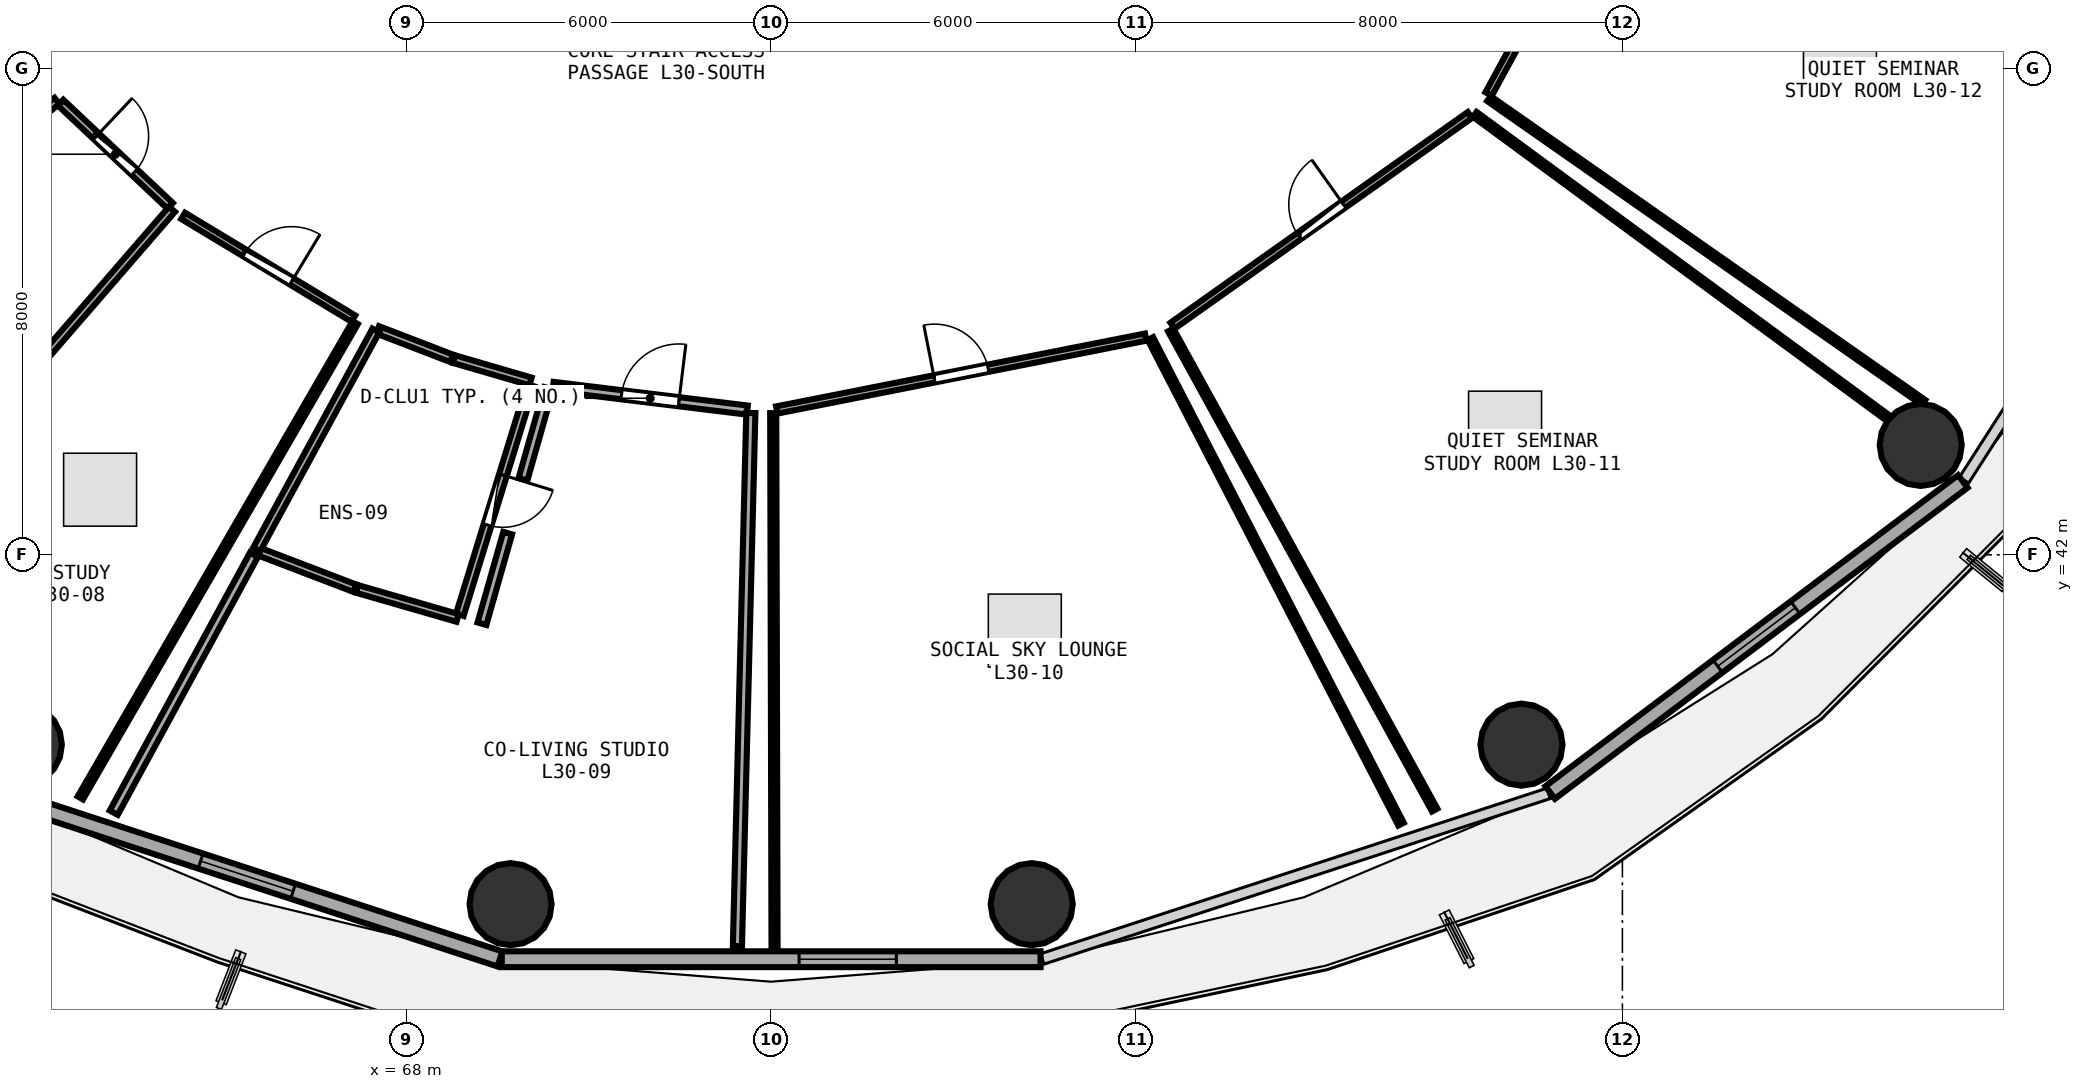
"""IFC4 building model, lengths in metres.
Left out: names, types, materials, properties, quantities, classifications, styles, units other than length and angle.
Written with IfcOpenShell. Run it as: python <this file> out.ifc"""

import sys

from ifc_helpers import new_model, si_unit, direction, frame, frame_2d, origin, origin_2d, place, context, subcontext, project, spatial, rectangle, circle, extrude, element, fill, save


model = new_model("IFC4")
c1 = context("Model", 3, precision=1e-05, world=origin(), true_north=direction((0.0, 1.0)))
c2 = subcontext(c1, "Body", "Model", "MODEL_VIEW")
j1 = project(units=[si_unit("LENGTHUNIT", "METRE"), si_unit("PLANEANGLEUNIT", "RADIAN")], contexts=[c1])
p1 = place(None, origin())
s1 = spatial("IfcSite", under=j1, at=p1, CompositionType="ELEMENT")
p2 = place(p1, origin())
s2 = spatial("IfcBuilding", under=s1, at=p2, CompositionType="ELEMENT")
p3 = place(p2, frame((0.0, 0.0, 117.6)))
s3 = spatial("IfcBuildingStorey", under=s2, at=p3, CompositionType="ELEMENT", Elevation=117.6)
for number, where, z_axis, x_axis in (
    (1, (61.66, 38.878, 0.0), (0.0, 0.0, 1.0), (1.0, 0.0, 0.0)),
    (2, (69.714, 36.255, 0.0), (0.0, 0.0, 1.0), (1.0, 0.0, 0.0)),
    (3, (78.286, 36.255, 0.0), (0.0, 0.0, 1.0), (1.0, 0.0, 0.0)),
    (4, (86.34, 38.878, 0.0), (0.0, 0.0, 1.0), (1.0, 0.0, 0.0)),
    (5, (92.906, 43.807, 0.0), (0.0, 0.0, 1.0), (1.0, 0.0, 0.0)),
):
    element("IfcColumn", number, at=place(p3, frame(where, z_axis=z_axis, x_axis=x_axis)), inside=s3, PredefinedType="COLUMN", context=c2, shape_type="SweptSolid", body=[
        extrude(circle(Radius=0.675, at=origin_2d()), origin(), (0.0, 0.0, 1.0), 3.75),
    ])
p4 = place(p3, frame((61.214, 38.077, 0.0), z_axis=(0.0, 0.0, 1.0), x_axis=(0.950471101963, -0.310812941064, 0.0)))
e6 = element("IfcWall", 6, at=p4, inside=s3, PredefinedType="SOLIDWALL", context=c2, shape_type="SweptSolid", body=[
    extrude(rectangle(XDim=8.76, YDim=0.26, at=frame_2d((4.38, 0.0))), origin(), (0.0, 0.0, 1.0), 3.475),
])
p5 = place(p4, frame((3.58, 0.0, 0.85)))
e7 = element("IfcOpeningElement", 7, at=p5, cuts=e6, PredefinedType="OPENING", context=c2, shape_type="SweptSolid", body=[
    extrude(rectangle(XDim=1.6, YDim=1.45, at=frame_2d((0.8, 0.725))), frame((0.0, 0.14, 0.0), z_axis=(0.0, -1.0, 0.0), x_axis=(1.0, 0.0, 0.0)), (0.0, 0.0, 1.0), 0.28),
])
p6 = place(p3, frame((69.57, 35.349, 0.0), z_axis=(0.0, 0.0, 1.0), x_axis=(1.0, 0.0, 0.0)))
e8 = element("IfcWall", 8, at=p6, inside=s3, PredefinedType="SOLIDWALL", context=c2, shape_type="SweptSolid", body=[
    extrude(rectangle(XDim=8.861, YDim=0.26, at=frame_2d((4.43, 0.0))), origin(), (0.0, 0.0, 1.0), 3.475),
])
p7 = place(p6, frame((4.89, 0.0, 0.85)))
e9 = element("IfcOpeningElement", 9, at=p7, cuts=e8, PredefinedType="OPENING", context=c2, shape_type="SweptSolid", body=[
    extrude(rectangle(XDim=1.6, YDim=1.45, at=frame_2d((0.8, 0.725))), frame((0.0, 0.14, 0.0), z_axis=(0.0, -1.0, 0.0), x_axis=(1.0, 0.0, 0.0)), (0.0, 0.0, 1.0), 0.28),
])
p8 = place(p3, frame((86.812, 38.09, 0.0), z_axis=(0.0, 0.0, 1.0), x_axis=(0.798501507879, 0.601992808857, 0.0)))
e10 = element("IfcWall", 10, at=p8, inside=s3, PredefinedType="SOLIDWALL", context=c2, shape_type="SweptSolid", body=[
    extrude(rectangle(XDim=8.499, YDim=0.26, at=frame_2d((4.25, 0.0))), origin(), (0.0, 0.0, 1.0), 3.475),
])
p9 = place(p8, frame((3.45, 0.0, 0.85)))
e11 = element("IfcOpeningElement", 11, at=p9, cuts=e10, PredefinedType="OPENING", context=c2, shape_type="SweptSolid", body=[
    extrude(rectangle(XDim=1.6, YDim=1.45, at=frame_2d((0.8, 0.725))), frame((0.0, 0.14, 0.0), z_axis=(0.0, -1.0, 0.0), x_axis=(1.0, 0.0, 0.0)), (0.0, 0.0, 1.0), 0.28),
])
p10 = place(p3, frame((62.314, 49.437, 0.0), z_axis=(0.0, 0.0, 1.0), x_axis=(0.727704720547, -0.68589054498, 0.0)))
e12 = element("IfcWall", 12, at=p10, inside=s3, PredefinedType="PLUMBINGWALL", context=c2, shape_type="SweptSolid", body=[
    extrude(rectangle(XDim=2.476, YDim=0.13, at=frame_2d((1.238, 0.0))), origin(), (0.0, 0.0, 1.0), 2.925),
])
p11 = place(p10, frame((0.808, 0.0, 0.0)))
e13 = element("IfcOpeningElement", 13, at=p11, cuts=e12, PredefinedType="OPENING", context=c2, shape_type="SweptSolid", body=[
    extrude(rectangle(XDim=0.86, YDim=2.05, at=frame_2d((0.43, 1.025))), frame((0.0, 0.075, 0.0), z_axis=(0.0, -1.0, 0.0), x_axis=(1.0, 0.0, 0.0)), (0.0, 0.0, 1.0), 0.15),
])
p12 = place(p3, frame((64.329, 47.574, 0.0), z_axis=(0.0, 0.0, 1.0), x_axis=(0.8562252486, -0.516602674848, 0.0)))
e14 = element("IfcWall", 14, at=p12, inside=s3, PredefinedType="PARTITIONING", context=c2, shape_type="SweptSolid", body=[
    extrude(rectangle(XDim=3.269, YDim=0.12, at=frame_2d((1.635, 0.0))), origin(), (0.0, 0.0, 1.0), 2.925),
])
p13 = place(p12, frame((1.185, 0.0, 0.0)))
e15 = element("IfcOpeningElement", 15, at=p13, cuts=e14, PredefinedType="OPENING", context=c2, shape_type="SweptSolid", body=[
    extrude(rectangle(XDim=0.9, YDim=2.08, at=frame_2d((0.45, 1.04))), frame((0.0, 0.07, 0.0), z_axis=(0.0, -1.0, 0.0), x_axis=(1.0, 0.0, 0.0)), (0.0, 0.0, 1.0), 0.14),
])
p14 = place(p3, frame((70.044, 44.789, 0.0), z_axis=(0.0, 0.0, 1.0), x_axis=(-0.294737077858, -0.955578387646, 0.0)))
e16 = element("IfcWall", 16, at=p14, inside=s3, PredefinedType="PLUMBINGWALL", context=c2, shape_type="SweptSolid", body=[
    extrude(rectangle(XDim=3.951, YDim=0.13, at=frame_2d((1.976, 0.0))), origin(), (0.0, 0.0, 1.0), 3.175),
])
p15 = place(p14, frame((1.545, 0.0, 0.0)))
e17 = element("IfcOpeningElement", 17, at=p15, cuts=e16, PredefinedType="OPENING", context=c2, shape_type="SweptSolid", body=[
    extrude(rectangle(XDim=0.86, YDim=2.05, at=frame_2d((0.43, 1.025))), frame((0.0, 0.075, 0.0), z_axis=(0.0, -1.0, 0.0), x_axis=(1.0, 0.0, 0.0)), (0.0, 0.0, 1.0), 0.15),
])
p16 = place(p3, frame((70.414, 44.77, 0.0), z_axis=(0.0, 0.0, 1.0), x_axis=(0.992649213004, -0.12102702146, 0.0)))
e18 = element("IfcWall", 18, at=p16, inside=s3, PredefinedType="PARTITIONING", context=c2, shape_type="SweptSolid", body=[
    extrude(rectangle(XDim=3.218, YDim=0.15, at=frame_2d((1.609, 0.0))), origin(), (0.0, 0.0, 1.0), 3.48),
])
p17 = place(p16, frame((1.134, 0.0, 0.0)))
e19 = element("IfcOpeningElement", 19, at=p17, cuts=e18, PredefinedType="OPENING", context=c2, shape_type="SweptSolid", body=[
    extrude(rectangle(XDim=0.95, YDim=2.08, at=frame_2d((0.475, 1.04))), frame((0.0, 0.085, 0.0), z_axis=(0.0, -1.0, 0.0), x_axis=(1.0, 0.0, 0.0)), (0.0, 0.0, 1.0), 0.17),
])
p18 = place(p3, frame((74.093, 44.382, 0.0), z_axis=(0.0, 0.0, 1.0), x_axis=(0.981035031673, 0.193830510061, 0.0)))
e20 = element("IfcWall", 20, at=p18, inside=s3, PredefinedType="PARTITIONING", context=c2, shape_type="SweptSolid", body=[
    extrude(rectangle(XDim=6.184, YDim=0.12, at=frame_2d((3.092, 0.0))), origin(), (0.0, 0.0, 1.0), 3.235),
])
p19 = place(p18, frame((2.642, 0.0, 0.0)))
e21 = element("IfcOpeningElement", 21, at=p19, cuts=e20, PredefinedType="OPENING", context=c2, shape_type="SweptSolid", body=[
    extrude(rectangle(XDim=0.9, YDim=2.08, at=frame_2d((0.45, 1.04))), frame((0.0, 0.07, 0.0), z_axis=(0.0, -1.0, 0.0), x_axis=(1.0, 0.0, 0.0)), (0.0, 0.0, 1.0), 0.14),
])
p20 = place(p3, frame((80.601, 45.768, 0.0), z_axis=(0.0, 0.0, 1.0), x_axis=(0.815932399176, 0.578147316846, 0.0)))
e22 = element("IfcWall", 22, at=p20, inside=s3, PredefinedType="PARTITIONING", context=c2, shape_type="SweptSolid", body=[
    extrude(rectangle(XDim=5.993, YDim=0.12, at=frame_2d((2.997, 0.0))), origin(), (0.0, 0.0, 1.0), 2.925),
])
p21 = place(p20, frame((2.546, 0.0, 0.0)))
e23 = element("IfcOpeningElement", 23, at=p21, cuts=e22, PredefinedType="OPENING", context=c2, shape_type="SweptSolid", body=[
    extrude(rectangle(XDim=0.9, YDim=2.08, at=frame_2d((0.45, 1.04))), frame((0.0, 0.07, 0.0), z_axis=(0.0, -1.0, 0.0), x_axis=(1.0, 0.0, 0.0)), (0.0, 0.0, 1.0), 0.14),
])
p22 = place(p3, frame((85.801, 49.579, 0.0), z_axis=(0.0, 0.0, 1.0), x_axis=(0.478256103777, 0.878220416069, 0.0)))
e24 = element("IfcWall", 24, at=p22, inside=s3, PredefinedType="PARTITIONING", context=c2, shape_type="SweptSolid", body=[
    extrude(rectangle(XDim=5.741, YDim=0.12, at=frame_2d((2.871, 0.0))), origin(), (0.0, 0.0, 1.0), 2.925),
])
p23 = place(p22, frame((2.42, 0.0, 0.0)))
e25 = element("IfcOpeningElement", 25, at=p23, cuts=e24, PredefinedType="OPENING", context=c2, shape_type="SweptSolid", body=[
    extrude(rectangle(XDim=0.9, YDim=2.08, at=frame_2d((0.45, 1.04))), frame((0.0, 0.07, 0.0), z_axis=(0.0, -1.0, 0.0), x_axis=(1.0, 0.0, 0.0)), (0.0, 0.0, 1.0), 0.14),
])
p24 = place(p3, frame((64.146, 47.683, 0.0), z_axis=(0.0, 0.0, 1.0), x_axis=(-0.654725816563, -0.75586645985, 0.0)))
e26 = element("IfcWall", 26, at=p24, inside=s3, PredefinedType="PLUMBINGWALL", context=c2, shape_type="SweptSolid", body=[
    extrude(rectangle(XDim=3.36, YDim=0.13, at=frame_2d((1.68, 0.0))), origin(), (0.0, 0.0, 1.0), 3.235),
])
p25 = place(p3, frame((59.633, 47.365, 0.0), z_axis=(0.0, 0.0, 1.0), x_axis=(0.780343931947, 0.625350579974, 0.0)))
e27 = element("IfcWall", 27, at=p25, inside=s3, PredefinedType="PLUMBINGWALL", context=c2, shape_type="SweptSolid", body=[
    extrude(rectangle(XDim=3.36, YDim=0.13, at=frame_2d((1.68, 0.0))), origin(), (0.0, 0.0, 1.0), 3.235),
])
p26 = place(p3, frame((67.16, 45.819, 0.0), z_axis=(0.0, 0.0, 1.0), x_axis=(-0.500668535271, -0.865639080558, 0.0)))
e28 = element("IfcWall", 28, at=p26, inside=s3, PredefinedType="PARTITIONING", context=c2, shape_type="SweptSolid", body=[
    extrude(rectangle(XDim=9.03, YDim=0.1, at=frame_2d((4.515, 0.0))), origin(), (0.0, 0.0, 1.0), 2.925),
])
p27 = place(p3, frame((67.528, 45.7, 0.0), z_axis=(0.0, 0.0, 1.0), x_axis=(0.933311844858, -0.359066846488, 0.0)))
e29 = element("IfcWall", 29, at=p27, inside=s3, PredefinedType="PLUMBINGWALL", context=c2, shape_type="SweptSolid", body=[
    extrude(rectangle(XDim=1.305, YDim=0.13, at=frame_2d((0.652, 0.0))), origin(), (0.0, 0.0, 1.0), 2.925),
])
p28 = place(p3, frame((68.783, 45.219, 0.0), z_axis=(0.0, 0.0, 1.0), x_axis=(0.960085412009, -0.279706992489, 0.0)))
e30 = element("IfcWall", 30, at=p28, inside=s3, PredefinedType="PLUMBINGWALL", context=c2, shape_type="SweptSolid", body=[
    extrude(rectangle(XDim=1.312, YDim=0.13, at=frame_2d((0.656, 0.0))), origin(), (0.0, 0.0, 1.0), 3.48),
])
p29 = place(p3, frame((68.843, 40.961, 0.0), z_axis=(0.0, 0.0, 1.0), x_axis=(-0.960750273448, 0.277414693321, 0.0)))
e31 = element("IfcWall", 31, at=p29, inside=s3, PredefinedType="PLUMBINGWALL", context=c2, shape_type="SweptSolid", body=[
    extrude(rectangle(XDim=1.723, YDim=0.13, at=frame_2d((0.862, 0.0))), origin(), (0.0, 0.0, 1.0), 2.925),
])
p30 = place(p3, frame((67.149, 41.452, 0.0), z_axis=(0.0, 0.0, 1.0), x_axis=(-0.934103540356, 0.357002207127, 0.0)))
e32 = element("IfcWall", 32, at=p30, inside=s3, PredefinedType="PLUMBINGWALL", context=c2, shape_type="SweptSolid", body=[
    extrude(rectangle(XDim=1.714, YDim=0.13, at=frame_2d((0.857, 0.0))), origin(), (0.0, 0.0, 1.0), 3.48),
])
p31 = place(p3, frame((65.54, 42.089, 0.0), z_axis=(0.0, 0.0, 1.0), x_axis=(0.478075883312, 0.878318535496, 0.0)))
e33 = element("IfcWall", 33, at=p31, inside=s3, PredefinedType="PLUMBINGWALL", context=c2, shape_type="SweptSolid", body=[
    extrude(rectangle(XDim=4.1, YDim=0.13, at=frame_2d((2.05, 0.0))), origin(), (0.0, 0.0, 1.0), 2.925),
])
p32 = place(p3, frame((73.666, 44.333, 0.0), z_axis=(0.0, 0.0, 1.0), x_axis=(-0.025193894125, -0.999682583473, 0.0)))
e34 = element("IfcWall", 34, at=p32, inside=s3, PredefinedType="PARTITIONING", context=c2, shape_type="SweptSolid", body=[
    extrude(rectangle(XDim=8.77, YDim=0.15, at=frame_2d((4.385, 0.0))), origin(), (0.0, 0.0, 1.0), 2.975),
])
p33 = place(p3, frame((63.188, 37.759, 0.0), z_axis=(0.0, 0.0, 1.0), x_axis=(0.477678819353, 0.878534544307, 0.0)))
e35 = element("IfcWall", 35, at=p33, inside=s3, PredefinedType="PARTITIONING", context=c2, shape_type="SweptSolid", body=[
    extrude(rectangle(XDim=4.827, YDim=0.15, at=frame_2d((2.414, 0.0))), origin(), (0.0, 0.0, 1.0), 2.975),
])
p34 = place(p3, frame((69.244, 40.866, 0.0), z_axis=(0.0, 0.0, 1.0), x_axis=(0.273076599945, 0.961992292361, 0.0)))
e36 = element("IfcWall", 36, at=p34, inside=s3, PredefinedType="PARTITIONING", context=c2, shape_type="SweptSolid", body=[
    extrude(rectangle(XDim=1.549, YDim=0.15, at=frame_2d((0.775, 0.0))), origin(), (0.0, 0.0, 1.0), 3.175),
])
p35 = place(p3, frame((69.918, 43.242, 0.0), z_axis=(0.0, 0.0, 1.0), x_axis=(0.273103794408, 0.961984572371, 0.0)))
e37 = element("IfcWall", 37, at=p35, inside=s3, PredefinedType="PARTITIONING", context=c2, shape_type="SweptSolid", body=[
    extrude(rectangle(XDim=1.555, YDim=0.15, at=frame_2d((0.778, 0.0))), origin(), (0.0, 0.0, 1.0), 3.48),
])
p36 = place(p3, frame((80.237, 45.556, 0.0), z_axis=(0.0, 0.0, 1.0), x_axis=(0.458694817529, -0.888593869196, 0.0)))
e38 = element("IfcWall", 38, at=p36, inside=s3, PredefinedType="PARTITIONING", context=c2, shape_type="SweptSolid", body=[
    extrude(rectangle(XDim=8.987, YDim=0.1, at=frame_2d((4.494, 0.0))), origin(), (0.0, 0.0, 1.0), 2.925),
])
p37 = place(p3, frame((74.056, 35.56, 0.0), z_axis=(0.0, 0.0, 1.0), x_axis=(-0.00247758273, 0.999996930787, 0.0)))
e39 = element("IfcWall", 39, at=p37, inside=s3, PredefinedType="PARTITIONING", context=c2, shape_type="SweptSolid", body=[
    extrude(rectangle(XDim=8.77, YDim=0.1, at=frame_2d((4.385, 0.0))), origin(), (0.0, 0.0, 1.0), 2.975),
])
p38 = place(p3, frame((85.572, 49.243, 0.0), z_axis=(0.0, 0.0, 1.0), x_axis=(0.805852200235, -0.592116737963, 0.0)))
e40 = element("IfcWall", 40, at=p38, inside=s3, PredefinedType="PARTITIONING", context=c2, shape_type="SweptSolid", body=[
    extrude(rectangle(XDim=8.43, YDim=0.1, at=frame_2d((4.215, 0.0))), origin(), (0.0, 0.0, 1.0), 2.925),
])
p39 = place(p3, frame((84.913, 37.803, 0.0), z_axis=(0.0, 0.0, 1.0), x_axis=(-0.481837612944, 0.876260529039, 0.0)))
e41 = element("IfcWall", 41, at=p39, inside=s3, PredefinedType="PARTITIONING", context=c2, shape_type="SweptSolid", body=[
    extrude(rectangle(XDim=9.01, YDim=0.1, at=frame_2d((4.505, 0.0))), origin(), (0.0, 0.0, 1.0), 2.925),
])
p40 = place(p3, frame((92.953, 44.506, 0.0), z_axis=(0.0, 0.0, 1.0), x_axis=(-0.8195552972, 0.573000100201, 0.0)))
e42 = element("IfcWall", 42, at=p40, inside=s3, PredefinedType="PARTITIONING", context=c2, shape_type="SweptSolid", body=[
    extrude(rectangle(XDim=8.722, YDim=0.1, at=frame_2d((4.361, 0.0))), origin(), (0.0, 0.0, 1.0), 3.175),
])
p41 = place(p5, origin())
e43 = element("IfcWindow", 43, at=p41, inside=s3, PartitioningType="SINGLE_PANEL", PredefinedType="WINDOW", context=c2, shape_type="SweptSolid", body=[
    extrude(rectangle(XDim=1.6, YDim=1.45, at=frame_2d((0.8, 0.725))), frame((0.0, 0.03, 0.0), z_axis=(0.0, -1.0, 0.0), x_axis=(1.0, 0.0, 0.0)), (0.0, 0.0, 1.0), 0.06),
])
fill(e7, e43)
p42 = place(p7, origin())
e44 = element("IfcWindow", 44, at=p42, inside=s3, PartitioningType="SINGLE_PANEL", PredefinedType="WINDOW", context=c2, shape_type="SweptSolid", body=[
    extrude(rectangle(XDim=1.6, YDim=1.45, at=frame_2d((0.8, 0.725))), frame((0.0, 0.03, 0.0), z_axis=(0.0, -1.0, 0.0), x_axis=(1.0, 0.0, 0.0)), (0.0, 0.0, 1.0), 0.06),
])
fill(e9, e44)
p43 = place(p9, origin())
e45 = element("IfcWindow", 45, at=p43, inside=s3, PartitioningType="SINGLE_PANEL", PredefinedType="WINDOW", context=c2, shape_type="SweptSolid", body=[
    extrude(rectangle(XDim=1.6, YDim=1.45, at=frame_2d((0.8, 0.725))), frame((0.0, 0.03, 0.0), z_axis=(0.0, -1.0, 0.0), x_axis=(1.0, 0.0, 0.0)), (0.0, 0.0, 1.0), 0.06),
])
fill(e11, e45)
p44 = place(p11, origin())
e46 = element("IfcDoor", 46, at=p44, inside=s3, OperationType="SINGLE_SWING_LEFT", PredefinedType="DOOR", context=c2, shape_type="SweptSolid", body=[
    extrude(rectangle(XDim=0.86, YDim=2.05, at=frame_2d((0.43, 1.025))), frame((0.0, 0.025, 0.0), z_axis=(0.0, -1.0, 0.0), x_axis=(1.0, 0.0, 0.0)), (0.0, 0.0, 1.0), 0.05),
])
fill(e13, e46)
p45 = place(p13, origin())
e47 = element("IfcDoor", 47, at=p45, inside=s3, OperationType="SINGLE_SWING_RIGHT", PredefinedType="DOOR", context=c2, shape_type="SweptSolid", body=[
    extrude(rectangle(XDim=0.9, YDim=2.08, at=frame_2d((0.45, 1.04))), frame((0.0, 0.025, 0.0), z_axis=(0.0, -1.0, 0.0), x_axis=(1.0, 0.0, 0.0)), (0.0, 0.0, 1.0), 0.05),
])
fill(e15, e47)
p46 = place(p15, origin())
e48 = element("IfcDoor", 48, at=p46, inside=s3, OperationType="SINGLE_SWING_LEFT", PredefinedType="DOOR", context=c2, shape_type="SweptSolid", body=[
    extrude(rectangle(XDim=0.86, YDim=2.05, at=frame_2d((0.43, 1.025))), frame((0.0, 0.025, 0.0), z_axis=(0.0, -1.0, 0.0), x_axis=(1.0, 0.0, 0.0)), (0.0, 0.0, 1.0), 0.05),
])
fill(e17, e48)
p47 = place(p17, origin())
e49 = element("IfcDoor", 49, at=p47, inside=s3, OperationType="SINGLE_SWING_RIGHT", PredefinedType="DOOR", context=c2, shape_type="SweptSolid", body=[
    extrude(rectangle(XDim=0.95, YDim=2.08, at=frame_2d((0.475, 1.04))), frame((0.0, 0.025, 0.0), z_axis=(0.0, -1.0, 0.0), x_axis=(1.0, 0.0, 0.0)), (0.0, 0.0, 1.0), 0.05),
])
fill(e19, e49)
p48 = place(p19, origin())
e50 = element("IfcDoor", 50, at=p48, inside=s3, OperationType="SINGLE_SWING_LEFT", PredefinedType="DOOR", context=c2, shape_type="SweptSolid", body=[
    extrude(rectangle(XDim=0.9, YDim=2.08, at=frame_2d((0.45, 1.04))), frame((0.0, 0.025, 0.0), z_axis=(0.0, -1.0, 0.0), x_axis=(1.0, 0.0, 0.0)), (0.0, 0.0, 1.0), 0.05),
])
fill(e21, e50)
p49 = place(p21, origin())
e51 = element("IfcDoor", 51, at=p49, inside=s3, OperationType="SINGLE_SWING_RIGHT", PredefinedType="DOOR", context=c2, shape_type="SweptSolid", body=[
    extrude(rectangle(XDim=0.9, YDim=2.08, at=frame_2d((0.45, 1.04))), frame((0.0, 0.025, 0.0), z_axis=(0.0, -1.0, 0.0), x_axis=(1.0, 0.0, 0.0)), (0.0, 0.0, 1.0), 0.05),
])
fill(e23, e51)
save(model, sys.argv[1])
